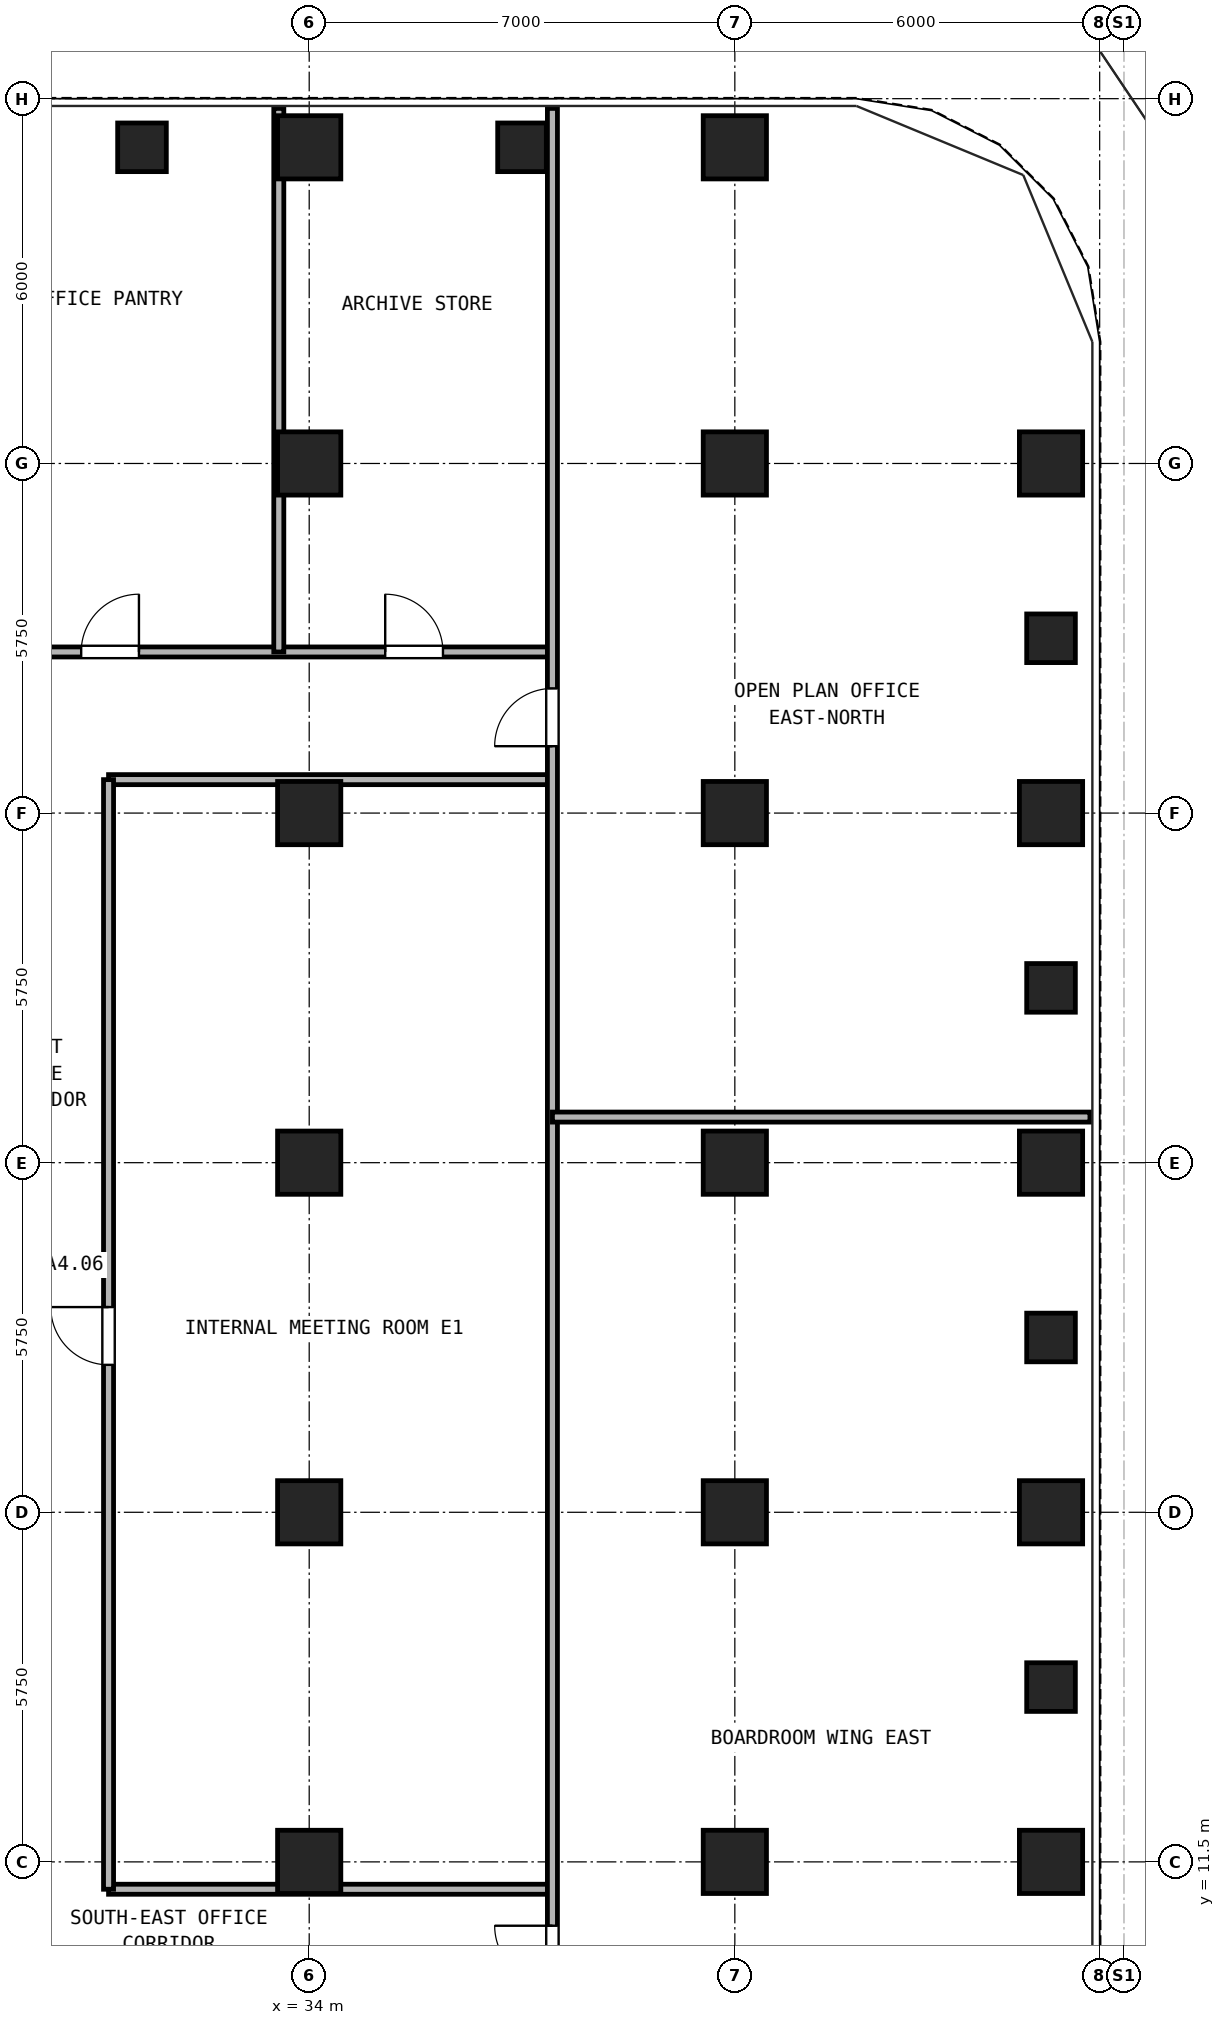
"""IFC4 building model, lengths in metres.
Left out: names, types, materials, properties, quantities, classifications, styles, units other than length and angle.
Written with IfcOpenShell. Run it as: python <this file> out.ifc"""

import sys

from ifc_helpers import new_model, si_unit, direction, frame, frame_2d, origin, origin_2d, place, context, subcontext, project, spatial, rectangle, hollow_rectangle, extrude, source, transform, mapped, element, fill, save


model = new_model("IFC4")
c1 = context("Model", 3, precision=1e-05, world=origin(), true_north=direction((0.0, 1.0)))
c2 = subcontext(c1, "Body", "Model", "MODEL_VIEW")
j1 = project(units=[si_unit("LENGTHUNIT", "METRE"), si_unit("PLANEANGLEUNIT", "RADIAN")], contexts=[c1])
p1 = place(None, origin())
s1 = spatial("IfcSite", under=j1, at=p1, CompositionType="ELEMENT")
p2 = place(p1, origin())
s2 = spatial("IfcBuilding", under=s1, at=p2, CompositionType="ELEMENT")
p3 = place(p2, frame((0.0, 0.0, 51.3)))
s3 = spatial("IfcBuildingStorey", under=s2, at=p3, CompositionType="ELEMENT", Elevation=51.3)
m1 = source(origin(), c2, "Body", "SweptSolid", [
    extrude(hollow_rectangle(XDim=1.04, YDim=1.04, WallThickness=0.065, at=origin_2d()), origin(), (0.0, 0.0, 1.0), 3.32),
])
for number, where, z_axis, x_axis in (
    (1, (34.0, 39.7, 0.0), (0.0, 0.0, 1.0), (1.0, 0.0, 0.0)),
    (2, (41.0, 39.7, 0.0), (0.0, 0.0, 1.0), (1.0, 0.0, 0.0)),
    (3, (46.2, 11.5, 0.0), (0.0, 0.0, 1.0), (1.0, 0.0, 0.0)),
    (4, (46.2, 17.25, 0.0), (0.0, 0.0, 1.0), (1.0, 0.0, 0.0)),
    (5, (46.2, 23.0, 0.0), (0.0, 0.0, 1.0), (1.0, 0.0, 0.0)),
    (6, (46.2, 28.75, 0.0), (0.0, 0.0, 1.0), (1.0, 0.0, 0.0)),
    (7, (46.2, 34.5, 0.0), (0.0, 0.0, 1.0), (1.0, 0.0, 0.0)),
    (8, (34.0, 11.5, 0.0), (0.0, 0.0, 1.0), (1.0, 0.0, 0.0)),
    (9, (34.0, 17.25, 0.0), (0.0, 0.0, 1.0), (1.0, 0.0, 0.0)),
    (10, (34.0, 23.0, 0.0), (0.0, 0.0, 1.0), (1.0, 0.0, 0.0)),
    (11, (34.0, 28.75, 0.0), (0.0, 0.0, 1.0), (1.0, 0.0, 0.0)),
    (12, (34.0, 34.5, 0.0), (0.0, 0.0, 1.0), (1.0, 0.0, 0.0)),
    (13, (41.0, 11.5, 0.0), (0.0, 0.0, 1.0), (1.0, 0.0, 0.0)),
    (14, (41.0, 17.25, 0.0), (0.0, 0.0, 1.0), (1.0, 0.0, 0.0)),
    (15, (41.0, 23.0, 0.0), (0.0, 0.0, 1.0), (1.0, 0.0, 0.0)),
    (16, (41.0, 28.75, 0.0), (0.0, 0.0, 1.0), (1.0, 0.0, 0.0)),
    (17, (41.0, 34.5, 0.0), (0.0, 0.0, 1.0), (1.0, 0.0, 0.0)),
):
    element("IfcColumn", number, at=place(p3, frame(where, z_axis=z_axis, x_axis=x_axis)), inside=s3, PredefinedType="COLUMN", context=c2, shape_type="MappedRepresentation", body=[
        mapped(m1, transform((0.0, 0.0, 0.0), x_axis=(1.0, 0.0, 0.0), y_axis=(0.0, 1.0, 0.0), z_axis=(0.0, 0.0, 1.0), scale=1.0)),
    ])
m2 = source(origin(), c2, "Body", "SweptSolid", [
    extrude(hollow_rectangle(XDim=0.8, YDim=0.8, WallThickness=0.045, at=origin_2d()), origin(), (0.0, 0.0, 1.0), 3.32),
])
for number, where, z_axis, x_axis in (
    (18, (31.25, 39.7, 0.0), (0.0, 0.0, 1.0), (1.0, 0.0, 0.0)),
    (19, (37.5, 39.7, 0.0), (0.0, 0.0, 1.0), (1.0, 0.0, 0.0)),
    (20, (46.2, 14.375, 0.0), (0.0, 0.0, 1.0), (1.0, 0.0, 0.0)),
    (21, (46.2, 20.125, 0.0), (0.0, 0.0, 1.0), (1.0, 0.0, 0.0)),
    (22, (46.2, 25.875, 0.0), (0.0, 0.0, 1.0), (1.0, 0.0, 0.0)),
    (23, (46.2, 31.625, 0.0), (0.0, 0.0, 1.0), (1.0, 0.0, 0.0)),
):
    element("IfcColumn", number, at=place(p3, frame(where, z_axis=z_axis, x_axis=x_axis)), inside=s3, PredefinedType="COLUMN", context=c2, shape_type="MappedRepresentation", body=[
        mapped(m2, transform((0.0, 0.0, 0.0), x_axis=(1.0, 0.0, 0.0), y_axis=(0.0, 1.0, 0.0), z_axis=(0.0, 0.0, 1.0), scale=1.0)),
    ])
p4 = place(p3, frame((9.0, 31.4, 0.0), z_axis=(0.0, 0.0, 1.0), x_axis=(1.0, 0.0, 0.0)))
e24 = element("IfcWall", 24, at=p4, inside=s3, PredefinedType="PARTITIONING", context=c2, shape_type="SweptSolid", body=[
    extrude(rectangle(XDim=29.0, YDim=0.165, at=frame_2d((14.5, 0.0))), origin(), (0.0, 0.0, 1.0), 2.898),
])
p5 = place(p4, frame((5.5, 0.0, 0.0)))
e25 = element("IfcOpeningElement", 25, at=p5, cuts=e24, PredefinedType="OPENING", context=c2, shape_type="SweptSolid", body=[
    extrude(rectangle(XDim=0.95, YDim=2.15, at=frame_2d((0.475, 1.075))), frame((0.0, 0.093, 0.0), z_axis=(0.0, -1.0, 0.0), x_axis=(1.0, 0.0, 0.0)), (0.0, 0.0, 1.0), 0.185),
])
p6 = place(p4, frame((15.0, 0.0, 0.0)))
e26 = element("IfcOpeningElement", 26, at=p6, cuts=e24, PredefinedType="OPENING", context=c2, shape_type="SweptSolid", body=[
    extrude(rectangle(XDim=0.95, YDim=2.15, at=frame_2d((0.475, 1.075))), frame((0.0, 0.093, 0.0), z_axis=(0.0, -1.0, 0.0), x_axis=(1.0, 0.0, 0.0)), (0.0, 0.0, 1.0), 0.185),
])
p7 = place(p4, frame((21.25, 0.0, 0.0)))
e27 = element("IfcOpeningElement", 27, at=p7, cuts=e24, PredefinedType="OPENING", context=c2, shape_type="SweptSolid", body=[
    extrude(rectangle(XDim=0.95, YDim=2.15, at=frame_2d((0.475, 1.075))), frame((0.0, 0.093, 0.0), z_axis=(0.0, -1.0, 0.0), x_axis=(1.0, 0.0, 0.0)), (0.0, 0.0, 1.0), 0.185),
])
p8 = place(p4, frame((26.25, 0.0, 0.0)))
e28 = element("IfcOpeningElement", 28, at=p8, cuts=e24, PredefinedType="OPENING", context=c2, shape_type="SweptSolid", body=[
    extrude(rectangle(XDim=0.95, YDim=2.15, at=frame_2d((0.475, 1.075))), frame((0.0, 0.093, 0.0), z_axis=(0.0, -1.0, 0.0), x_axis=(1.0, 0.0, 0.0)), (0.0, 0.0, 1.0), 0.185),
])
for number, where, z_axis, x_axis in (
    (29, (30.7, 11.05, 0.0), (0.0, 0.0, 1.0), (1.0, 0.0, 0.0)),
    (30, (30.7, 29.3, 0.0), (0.0, 0.0, 1.0), (1.0, 0.0, 0.0)),
):
    element("IfcWall", number, at=place(p3, frame(where, z_axis=z_axis, x_axis=x_axis)), inside=s3, PredefinedType="PARTITIONING", context=c2, shape_type="SweptSolid", body=[
        extrude(rectangle(XDim=7.3, YDim=0.165, at=frame_2d((3.65, 0.0))), origin(), (0.0, 0.0, 1.0), 3.32),
    ])
p9 = place(p3, frame((30.7, 11.05, 0.0), z_axis=(0.0, 0.0, 1.0), x_axis=(0.0, 1.0, 0.0)))
e31 = element("IfcWall", 31, at=p9, inside=s3, PredefinedType="PARTITIONING", context=c2, shape_type="SweptSolid", body=[
    extrude(rectangle(XDim=18.25, YDim=0.165, at=frame_2d((9.125, 0.0))), origin(), (0.0, 0.0, 1.0), 3.32),
])
p10 = place(p9, frame((8.625, 0.0, 0.0)))
e32 = element("IfcOpeningElement", 32, at=p10, cuts=e31, PredefinedType="OPENING", context=c2, shape_type="SweptSolid", body=[
    extrude(rectangle(XDim=0.95, YDim=2.15, at=frame_2d((0.475, 1.075))), frame((0.0, 0.093, 0.0), z_axis=(0.0, -1.0, 0.0), x_axis=(1.0, 0.0, 0.0)), (0.0, 0.0, 1.0), 0.185),
])
p11 = place(p3, frame((38.0, 0.16, 0.0), z_axis=(0.0, 0.0, 1.0), x_axis=(0.0, 1.0, 0.0)))
e33 = element("IfcWall", 33, at=p11, inside=s3, PredefinedType="PARTITIONING", context=c2, shape_type="SweptSolid", body=[
    extrude(rectangle(XDim=40.18, YDim=0.165, at=frame_2d((20.09, 0.0))), origin(), (0.0, 0.0, 1.0), 3.32),
])
p12 = place(p11, frame((9.34, 0.0, 0.0)))
e34 = element("IfcOpeningElement", 34, at=p12, cuts=e33, PredefinedType="OPENING", context=c2, shape_type="SweptSolid", body=[
    extrude(rectangle(XDim=0.95, YDim=2.15, at=frame_2d((0.475, 1.075))), frame((0.0, 0.093, 0.0), z_axis=(0.0, -1.0, 0.0), x_axis=(1.0, 0.0, 0.0)), (0.0, 0.0, 1.0), 0.185),
])
p13 = place(p11, frame((29.69, 0.0, 0.0)))
e35 = element("IfcOpeningElement", 35, at=p13, cuts=e33, PredefinedType="OPENING", context=c2, shape_type="SweptSolid", body=[
    extrude(rectangle(XDim=0.95, YDim=2.15, at=frame_2d((0.475, 1.075))), frame((0.0, 0.093, 0.0), z_axis=(0.0, -1.0, 0.0), x_axis=(1.0, 0.0, 0.0)), (0.0, 0.0, 1.0), 0.185),
])
p14 = place(p3, frame((33.5, 31.4, 0.0), z_axis=(0.0, 0.0, 1.0), x_axis=(0.0, 1.0, 0.0)))
e36 = element("IfcWall", 36, at=p14, inside=s3, PredefinedType="PARTITIONING", context=c2, shape_type="SweptSolid", body=[
    extrude(rectangle(XDim=8.94, YDim=0.165, at=frame_2d((4.47, 0.0))), origin(), (0.0, 0.0, 1.0), 3.32),
])
p15 = place(p3, frame((38.0, 23.75, 0.0), z_axis=(0.0, 0.0, 1.0), x_axis=(1.0, 0.0, 0.0)))
e37 = element("IfcWall", 37, at=p15, inside=s3, PredefinedType="PARTITIONING", context=c2, shape_type="SweptSolid", body=[
    extrude(rectangle(XDim=8.84, YDim=0.165, at=frame_2d((4.42, 0.0))), origin(), (0.0, 0.0, 1.0), 3.32),
])
p16 = place(p7, origin())
e38 = element("IfcDoor", 38, at=p16, inside=s3, OperationType="SINGLE_SWING_RIGHT", PredefinedType="DOOR", context=c2, shape_type="SweptSolid", body=[
    extrude(rectangle(XDim=0.95, YDim=2.15, at=frame_2d((0.475, 1.075))), frame((0.0, 0.025, 0.0), z_axis=(0.0, -1.0, 0.0), x_axis=(1.0, 0.0, 0.0)), (0.0, 0.0, 1.0), 0.05),
])
fill(e27, e38)
p17 = place(p8, origin())
e39 = element("IfcDoor", 39, at=p17, inside=s3, OperationType="SINGLE_SWING_LEFT", PredefinedType="DOOR", context=c2, shape_type="SweptSolid", body=[
    extrude(rectangle(XDim=0.95, YDim=2.15, at=frame_2d((0.475, 1.075))), frame((0.0, 0.025, 0.0), z_axis=(0.0, -1.0, 0.0), x_axis=(1.0, 0.0, 0.0)), (0.0, 0.0, 1.0), 0.05),
])
fill(e28, e39)
p18 = place(p12, origin())
e40 = element("IfcDoor", 40, at=p18, inside=s3, OperationType="SINGLE_SWING_RIGHT", PredefinedType="DOOR", context=c2, shape_type="SweptSolid", body=[
    extrude(rectangle(XDim=0.95, YDim=2.15, at=frame_2d((0.475, 1.075))), frame((0.0, 0.025, 0.0), z_axis=(0.0, -1.0, 0.0), x_axis=(1.0, 0.0, 0.0)), (0.0, 0.0, 1.0), 0.05),
])
fill(e34, e40)
p19 = place(p13, origin())
e41 = element("IfcDoor", 41, at=p19, inside=s3, OperationType="SINGLE_SWING_LEFT", PredefinedType="DOOR", context=c2, shape_type="SweptSolid", body=[
    extrude(rectangle(XDim=0.95, YDim=2.15, at=frame_2d((0.475, 1.075))), frame((0.0, 0.025, 0.0), z_axis=(0.0, -1.0, 0.0), x_axis=(1.0, 0.0, 0.0)), (0.0, 0.0, 1.0), 0.05),
])
fill(e35, e41)
p20 = place(p10, origin())
e42 = element("IfcDoor", 42, at=p20, inside=s3, OperationType="SINGLE_SWING_RIGHT", PredefinedType="DOOR", context=c2, shape_type="SweptSolid", body=[
    extrude(rectangle(XDim=0.95, YDim=2.15, at=frame_2d((0.475, 1.075))), frame((0.0, 0.025, 0.0), z_axis=(0.0, -1.0, 0.0), x_axis=(1.0, 0.0, 0.0)), (0.0, 0.0, 1.0), 0.05),
])
fill(e32, e42)
save(model, sys.argv[1])
